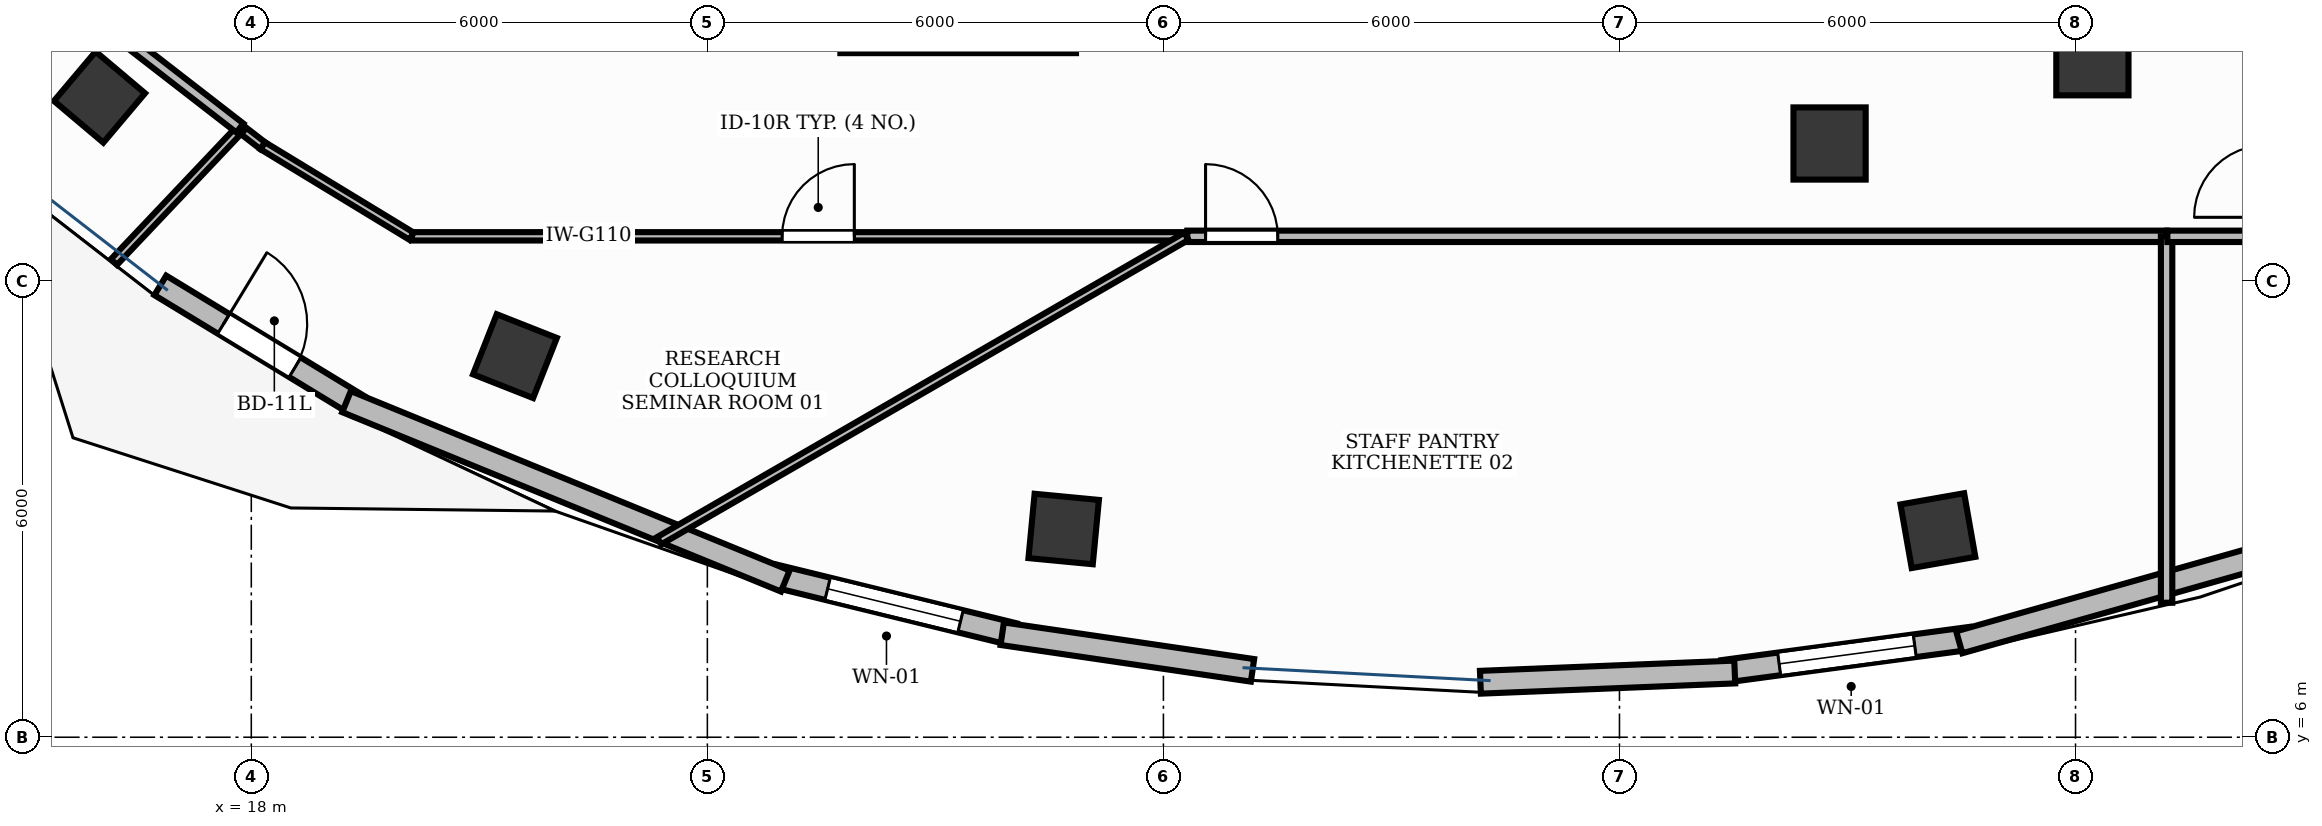
"""IFC4 building model, lengths in metres.
Left out: names, types, materials, properties, quantities, classifications, styles, units other than length and angle.
Written with IfcOpenShell. Run it as: python <this file> out.ifc"""

import sys

from ifc_helpers import new_model, si_unit, direction, frame, frame_2d, origin, origin_2d, place, context, subcontext, project, spatial, rectangle, extrude, element, fill, save


model = new_model("IFC4")
c1 = context("Model", 3, precision=1e-05, world=origin(), true_north=direction((0.0, 1.0)))
c2 = subcontext(c1, "Body", "Model", "MODEL_VIEW")
j1 = project(units=[si_unit("LENGTHUNIT", "METRE"), si_unit("PLANEANGLEUNIT", "RADIAN")], contexts=[c1])
p1 = place(None, origin())
s1 = spatial("IfcSite", under=j1, at=p1, CompositionType="ELEMENT")
p2 = place(p1, origin())
s2 = spatial("IfcBuilding", under=s1, at=p2, CompositionType="ELEMENT")
p3 = place(p2, frame((0.0, 0.0, 273.0)))
s3 = spatial("IfcBuildingStorey", under=s2, at=p3, CompositionType="ELEMENT", Elevation=273.0)
p4 = place(p3, frame((25.75, 15.2, 0.0), z_axis=(0.0, 0.0, 1.0), x_axis=(1.0, 0.0, 0.0)))
e1 = element("IfcWall", 1, at=p4, inside=s3, PredefinedType="SHEAR", context=c2, shape_type="SweptSolid", body=[
    extrude(rectangle(XDim=3.1, YDim=0.4, at=frame_2d((1.55, 0.0))), origin(), (0.0, 0.0, 1.0), 3.88),
])
for number, where, z_axis, x_axis in (
    (2, (16.003, 14.421, -0.0), (0.0, 0.0, 1.0), (-0.764, 0.645, 0.0)),
    (3, (21.469, 11.014, -0.0), (0.0, 0.0, 1.0), (-0.93, 0.367, 0.0)),
    (4, (28.688, 8.739, -0.0), (0.0, 0.0, 1.0), (-0.995, 0.095, 0.0)),
    (5, (40.189, 8.718, -0.0), (0.0, 0.0, 1.0), (0.985, 0.173, 0.0)),
):
    element("IfcColumn", number, at=place(p3, frame(where, z_axis=z_axis, x_axis=x_axis)), inside=s3, PredefinedType="COLUMN", context=c2, shape_type="SweptSolid", body=[
        extrude(rectangle(XDim=0.85, YDim=0.85, at=origin_2d()), origin(), (0.0, 0.0, 1.0), 3.881),
    ])
for number, where, z_axis, x_axis in (
    (6, (38.764, 13.811, -0.0), (0.0, 0.0, 1.0), (1.0, 0.0, 0.0)),
    (7, (42.222, 14.919, -0.0), (0.0, 0.0, 1.0), (1.0, 0.0, 0.0)),
):
    element("IfcColumn", number, at=place(p3, frame(where, z_axis=z_axis, x_axis=x_axis)), inside=s3, PredefinedType="COLUMN", context=c2, shape_type="SweptSolid", body=[
        extrude(rectangle(XDim=0.95, YDim=0.95, at=origin_2d()), origin(), (0.0, 0.0, 1.0), 3.881),
    ])
p5 = place(p3, frame((16.803, 11.945, 0.0), z_axis=(0.0, 0.0, 1.0), x_axis=(0.854482916714, -0.519479494344, 0.0)))
e8 = element("IfcWall", 8, at=p5, inside=s3, PredefinedType="STANDARD", context=c2, shape_type="SweptSolid", body=[
    extrude(rectangle(XDim=3.049, YDim=0.3, at=frame_2d((1.524, 0.0))), origin(), (0.0, 0.0, 1.0), 3.88),
])
p6 = place(p5, frame((0.975, 0.0, 0.0)))
e9 = element("IfcOpeningElement", 9, at=p6, cuts=e8, PredefinedType="OPENING", context=c2, shape_type="SweptSolid", body=[
    extrude(rectangle(XDim=1.1, YDim=2.15, at=frame_2d((0.55, 1.075))), frame((0.0, 0.165, 0.0), z_axis=(0.0, -1.0, 0.0), x_axis=(1.0, 0.0, 0.0)), (0.0, 0.0, 1.0), 0.33),
])
p7 = place(p3, frame((24.878, 8.126, 0.0), z_axis=(0.0, 0.0, 1.0), x_axis=(0.971310768778, -0.237813772636, 0.0)))
e10 = element("IfcWall", 10, at=p7, inside=s3, PredefinedType="STANDARD", context=c2, shape_type="SweptSolid", body=[
    extrude(rectangle(XDim=3.25, YDim=0.3, at=frame_2d((1.625, 0.0))), origin(), (0.0, 0.0, 1.0), 3.88),
])
p8 = place(p7, frame((0.725, 0.0, 0.9)))
e11 = element("IfcOpeningElement", 11, at=p8, cuts=e10, PredefinedType="OPENING", context=c2, shape_type="SweptSolid", body=[
    extrude(rectangle(XDim=1.8, YDim=2.1, at=frame_2d((0.9, 1.05))), frame((0.0, 0.165, 0.0), z_axis=(0.0, -1.0, 0.0), x_axis=(1.0, 0.0, 0.0)), (0.0, 0.0, 1.0), 0.33),
])
p9 = place(p3, frame((37.362, 6.865, 0.0), z_axis=(0.0, 0.0, 1.0), x_axis=(0.991126551491, 0.132921627022, 0.0)))
e12 = element("IfcWall", 12, at=p9, inside=s3, PredefinedType="STANDARD", context=c2, shape_type="SweptSolid", body=[
    extrude(rectangle(XDim=3.292, YDim=0.3, at=frame_2d((1.646, 0.0))), origin(), (0.0, 0.0, 1.0), 3.88),
])
p10 = place(p9, frame((0.746, 0.0, 0.9)))
e13 = element("IfcOpeningElement", 13, at=p10, cuts=e12, PredefinedType="OPENING", context=c2, shape_type="SweptSolid", body=[
    extrude(rectangle(XDim=1.8, YDim=2.1, at=frame_2d((0.9, 1.05))), frame((0.0, 0.165, 0.0), z_axis=(0.0, -1.0, 0.0), x_axis=(1.0, 0.0, 0.0)), (0.0, 0.0, 1.0), 0.33),
])
p11 = place(p3, frame((19.253, 10.415, 0.0), z_axis=(0.0, 0.0, 1.0), x_axis=(0.925644837168, -0.378393492841, 0.0)))
e14 = element("IfcWall", 14, at=p11, inside=s3, PredefinedType="STANDARD", context=c2, shape_type="SweptSolid", body=[
    extrude(rectangle(XDim=6.236, YDim=0.3, at=frame_2d((3.118, 0.0))), origin(), (0.0, 0.0, 1.0), 3.88),
])
p12 = place(p3, frame((27.879, 7.362, 0.0), z_axis=(0.0, 0.0, 1.0), x_axis=(0.989457987501, -0.144820202219, 0.0)))
e15 = element("IfcWall", 15, at=p12, inside=s3, PredefinedType="STANDARD", context=c2, shape_type="SweptSolid", body=[
    extrude(rectangle(XDim=3.328, YDim=0.3, at=frame_2d((1.664, 0.0))), origin(), (0.0, 0.0, 1.0), 3.88),
])
p13 = place(p3, frame((34.17, 6.723, 0.0), z_axis=(0.0, 0.0, 1.0), x_axis=(0.999189974351, 0.040241709167, 0.0)))
e16 = element("IfcWall", 16, at=p13, inside=s3, PredefinedType="STANDARD", context=c2, shape_type="SweptSolid", body=[
    extrude(rectangle(XDim=3.349, YDim=0.3, at=frame_2d((1.674, 0.0))), origin(), (0.0, 0.0, 1.0), 3.88),
])
p14 = place(p3, frame((40.47, 7.249, 0.0), z_axis=(0.0, 0.0, 1.0), x_axis=(0.962160382219, 0.272483758943, 0.0)))
e17 = element("IfcWall", 17, at=p14, inside=s3, PredefinedType="STANDARD", context=c2, shape_type="SweptSolid", body=[
    extrude(rectangle(XDim=6.372, YDim=0.3, at=frame_2d((3.186, 0.0))), origin(), (0.0, 0.0, 1.0), 3.88),
])
p15 = place(p3, frame((20.114, 12.59, 0.0), z_axis=(0.0, 0.0, 1.0), x_axis=(1.0, 0.0, 0.0)))
e18 = element("IfcWall", 18, at=p15, inside=s3, PredefinedType="MOVABLE", context=c2, shape_type="SweptSolid", body=[
    extrude(rectangle(XDim=10.188, YDim=0.11, at=frame_2d((5.094, 0.0))), origin(), (0.0, 0.0, 1.0), 2.89),
])
p16 = place(p15, frame((4.87, 0.0, 0.0)))
e19 = element("IfcOpeningElement", 19, at=p16, cuts=e18, PredefinedType="OPENING", context=c2, shape_type="SweptSolid", body=[
    extrude(rectangle(XDim=0.95, YDim=2.15, at=frame_2d((0.475, 1.075))), frame((0.0, 0.07, 0.0), z_axis=(0.0, -1.0, 0.0), x_axis=(1.0, 0.0, 0.0)), (0.0, 0.0, 1.0), 0.14),
])
p17 = place(p3, frame((30.314, 12.59, 0.0), z_axis=(0.0, 0.0, 1.0), x_axis=(1.0, 0.0, 0.0)))
e20 = element("IfcWall", 20, at=p17, inside=s3, PredefinedType="PARTITIONING", context=c2, shape_type="SweptSolid", body=[
    extrude(rectangle(XDim=12.884, YDim=0.15, at=frame_2d((6.442, 0.0))), origin(), (0.0, 0.0, 1.0), 2.89),
])
p18 = place(p17, frame((0.24, 0.0, 0.0)))
e21 = element("IfcOpeningElement", 21, at=p18, cuts=e20, PredefinedType="OPENING", context=c2, shape_type="SweptSolid", body=[
    extrude(rectangle(XDim=0.95, YDim=2.15, at=frame_2d((0.475, 1.075))), frame((0.0, 0.09, 0.0), z_axis=(0.0, -1.0, 0.0), x_axis=(1.0, 0.0, 0.0)), (0.0, 0.0, 1.0), 0.18),
])
p19 = place(p3, frame((17.858, 14.009, 0.0), z_axis=(0.0, 0.0, 1.0), x_axis=(0.790486870827, -0.612478984986, 0.0)))
e22 = element("IfcWall", 22, at=p19, inside=s3, PredefinedType="MOVABLE", context=c2, shape_type="SweptSolid", body=[
    extrude(rectangle(XDim=0.37, YDim=0.11, at=frame_2d((0.185, 0.0))), origin(), (0.0, 0.0, 1.0), 2.89),
])
p20 = place(p3, frame((18.151, 13.781, 0.0), z_axis=(0.0, 0.0, 1.0), x_axis=(0.854507101003, -0.519439711935, 0.0)))
e23 = element("IfcWall", 23, at=p20, inside=s3, PredefinedType="MOVABLE", context=c2, shape_type="SweptSolid", body=[
    extrude(rectangle(XDim=2.291, YDim=0.11, at=frame_2d((1.146, 0.0))), origin(), (0.0, 0.0, 1.0), 2.89),
])
p21 = place(p3, frame((30.302, 12.59, 0.0), z_axis=(0.0, 0.0, 1.0), x_axis=(-0.866017589642, -0.500013534248, 0.0)))
e24 = element("IfcWall", 24, at=p21, inside=s3, PredefinedType="MOVABLE", context=c2, shape_type="SweptSolid", body=[
    extrude(rectangle(XDim=8.01, YDim=0.11, at=frame_2d((4.005, 0.0))), origin(), (0.0, 0.0, 1.0), 2.89),
])
p22 = place(p3, frame((16.193, 12.251, 0.0), z_axis=(0.0, 0.0, 1.0), x_axis=(0.687683096997, 0.726010990347, 0.0)))
e25 = element("IfcWall", 25, at=p22, inside=s3, PredefinedType="MOVABLE", context=c2, shape_type="SweptSolid", body=[
    extrude(rectangle(XDim=2.42, YDim=0.11, at=frame_2d((1.21, 0.0))), origin(), (0.0, 0.0, 1.0), 2.89),
])
p23 = place(p3, frame((43.198, 12.59, 0.0), z_axis=(0.0, 0.0, 1.0), x_axis=(0.0, -1.0, 0.0)))
e26 = element("IfcWall", 26, at=p23, inside=s3, PredefinedType="PARTITIONING", context=c2, shape_type="SweptSolid", body=[
    extrude(rectangle(XDim=4.821, YDim=0.15, at=frame_2d((2.41, 0.0))), origin(), (0.0, 0.0, 1.0), 2.89),
])
p24 = place(p3, frame((43.208, 12.59, 0.0), z_axis=(0.0, 0.0, 1.0), x_axis=(1.0, 0.0, 0.0)))
e27 = element("IfcWall", 27, at=p24, inside=s3, PredefinedType="PARTITIONING", context=c2, shape_type="SweptSolid", body=[
    extrude(rectangle(XDim=1.292, YDim=0.15, at=frame_2d((0.646, 0.0))), origin(), (0.0, 0.0, 1.0), 2.89),
])
p25 = place(p3, frame((16.128, 15.349, 0.0), z_axis=(0.0, 0.0, 1.0), x_axis=(0.790443547822, -0.612534895093, 0.0)))
e28 = element("IfcWall", 28, at=p25, inside=s3, PredefinedType="PARTITIONING", context=c2, shape_type="SweptSolid", body=[
    extrude(rectangle(XDim=2.178, YDim=0.15, at=frame_2d((1.089, 0.0))), origin(), (0.0, 0.0, 1.0), 2.89),
])
p26 = place(p6, origin())
e29 = element("IfcDoor", 29, at=p26, inside=s3, OperationType="SINGLE_SWING_LEFT", PredefinedType="DOOR", context=c2, shape_type="SweptSolid", body=[
    extrude(rectangle(XDim=1.1, YDim=2.15, at=frame_2d((0.55, 1.075))), frame((0.0, 0.025, 0.0), z_axis=(0.0, -1.0, 0.0), x_axis=(1.0, 0.0, 0.0)), (0.0, 0.0, 1.0), 0.05),
])
fill(e9, e29)
p27 = place(p8, origin())
e30 = element("IfcWindow", 30, at=p27, inside=s3, PartitioningType="SINGLE_PANEL", PredefinedType="WINDOW", context=c2, shape_type="SweptSolid", body=[
    extrude(rectangle(XDim=1.8, YDim=2.1, at=frame_2d((0.9, 1.05))), frame((0.0, 0.03, 0.0), z_axis=(0.0, -1.0, 0.0), x_axis=(1.0, 0.0, 0.0)), (0.0, 0.0, 1.0), 0.06),
])
fill(e11, e30)
p28 = place(p10, origin())
e31 = element("IfcWindow", 31, at=p28, inside=s3, PartitioningType="SINGLE_PANEL", PredefinedType="WINDOW", context=c2, shape_type="SweptSolid", body=[
    extrude(rectangle(XDim=1.8, YDim=2.1, at=frame_2d((0.9, 1.05))), frame((0.0, 0.03, 0.0), z_axis=(0.0, -1.0, 0.0), x_axis=(1.0, 0.0, 0.0)), (0.0, 0.0, 1.0), 0.06),
])
fill(e13, e31)
p29 = place(p16, origin())
e32 = element("IfcDoor", 32, at=p29, inside=s3, OperationType="SINGLE_SWING_RIGHT", PredefinedType="DOOR", context=c2, shape_type="SweptSolid", body=[
    extrude(rectangle(XDim=0.95, YDim=2.15, at=frame_2d((0.475, 1.075))), frame((0.0, 0.025, 0.0), z_axis=(0.0, -1.0, 0.0), x_axis=(1.0, 0.0, 0.0)), (0.0, 0.0, 1.0), 0.05),
])
fill(e19, e32)
p30 = place(p18, origin())
e33 = element("IfcDoor", 33, at=p30, inside=s3, OperationType="SINGLE_SWING_LEFT", PredefinedType="DOOR", context=c2, shape_type="SweptSolid", body=[
    extrude(rectangle(XDim=0.95, YDim=2.15, at=frame_2d((0.475, 1.075))), frame((0.0, 0.025, 0.0), z_axis=(0.0, -1.0, 0.0), x_axis=(1.0, 0.0, 0.0)), (0.0, 0.0, 1.0), 0.05),
])
fill(e21, e33)
save(model, sys.argv[1])
